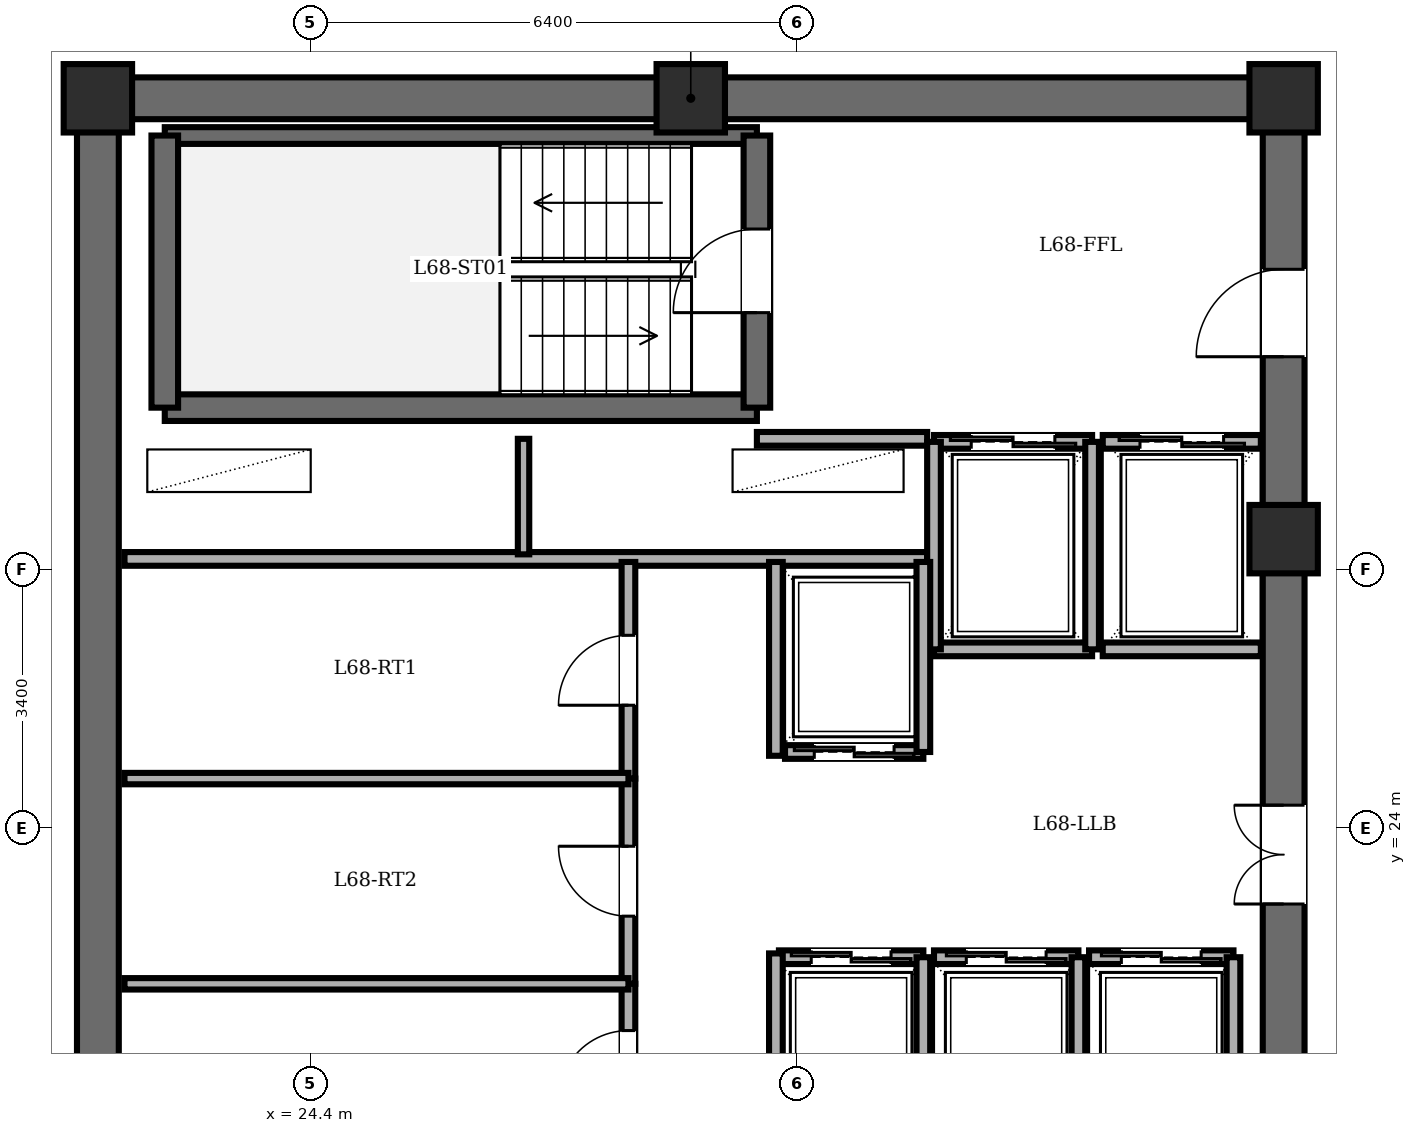
"""IFC4 building model, lengths in metres.
Left out: names, types, materials, properties, quantities, classifications, styles, units other than length and angle.
Written with IfcOpenShell. Run it as: python <this file> out.ifc"""

import sys

from ifc_helpers import new_model, si_unit, direction, frame, frame_2d, origin, origin_2d, place, context, subcontext, project, spatial, rectangle, extrude, element, fill, save


model = new_model("IFC4")
c1 = context("Model", 3, precision=1e-05, world=origin(), true_north=direction((0.0, 1.0)))
c2 = subcontext(c1, "Body", "Model", "MODEL_VIEW")
j1 = project(units=[si_unit("LENGTHUNIT", "METRE"), si_unit("PLANEANGLEUNIT", "RADIAN")], contexts=[c1])
p1 = place(None, origin())
s1 = spatial("IfcSite", under=j1, at=p1, CompositionType="ELEMENT")
p2 = place(p1, origin())
s2 = spatial("IfcBuilding", under=s1, at=p2, CompositionType="ELEMENT")
p3 = place(p2, frame((0.0, 0.0, 262.45)))
s3 = spatial("IfcBuildingStorey", under=s2, at=p3, CompositionType="ELEMENT", Elevation=262.45)
for number, where, z_axis, x_axis in (
    (1, (37.2, 27.8, 0.0), (0.0, 0.0, 1.0), (1.0, 0.0, 0.0)),
    (2, (37.2, 33.6, 0.0), (0.0, 0.0, 1.0), (1.0, 0.0, 0.0)),
    (3, (29.4, 33.6, 0.0), (0.0, 0.0, 1.0), (1.0, 0.0, 0.0)),
    (4, (21.6, 33.6, 0.0), (0.0, 0.0, 1.0), (1.0, 0.0, 0.0)),
):
    element("IfcColumn", number, at=place(p3, frame(where, z_axis=z_axis, x_axis=x_axis)), inside=s3, PredefinedType="COLUMN", context=c2, shape_type="SweptSolid", body=[
        extrude(rectangle(XDim=0.9, YDim=0.9, at=origin_2d()), origin(), (0.0, 0.0, 1.0), 3.65),
    ])
p4 = place(p3, frame((21.6, 14.4, 0.0), z_axis=(0.0, 0.0, 1.0), x_axis=(0.0, 1.0, 0.0)))
e5 = element("IfcWall", 5, at=p4, inside=s3, PredefinedType="SHEAR", context=c2, shape_type="SweptSolid", body=[
    extrude(rectangle(XDim=19.2, YDim=0.55, at=frame_2d((9.6, 0.0))), origin(), (0.0, 0.0, 1.0), 3.45),
])
p5 = place(p3, frame((21.6, 33.6, 0.0), z_axis=(0.0, 0.0, 1.0), x_axis=(1.0, 0.0, 0.0)))
e6 = element("IfcWall", 6, at=p5, inside=s3, PredefinedType="SHEAR", context=c2, shape_type="SweptSolid", body=[
    extrude(rectangle(XDim=15.6, YDim=0.55, at=frame_2d((7.8, 0.0))), origin(), (0.0, 0.0, 1.0), 3.45),
])
p6 = place(p3, frame((37.2, 14.4, 0.0), z_axis=(0.0, 0.0, 1.0), x_axis=(0.0, 1.0, 0.0)))
e7 = element("IfcWall", 7, at=p6, inside=s3, PredefinedType="SHEAR", context=c2, shape_type="SweptSolid", body=[
    extrude(rectangle(XDim=19.2, YDim=0.55, at=frame_2d((9.6, 0.0))), origin(), (0.0, 0.0, 1.0), 3.45),
])
p7 = place(p6, frame((15.8, 0.0, 0.0)))
e8 = element("IfcOpeningElement", 8, at=p7, cuts=e7, PredefinedType="OPENING", context=c2, shape_type="SweptSolid", body=[
    extrude(rectangle(XDim=1.15, YDim=2.15, at=frame_2d((0.575, 1.075))), frame((0.0, 0.285, 0.0), z_axis=(0.0, -1.0, 0.0), x_axis=(1.0, 0.0, 0.0)), (0.0, 0.0, 1.0), 0.57),
])
p8 = place(p6, frame((3.6, 0.0, 0.0)))
e9 = element("IfcOpeningElement", 9, at=p8, cuts=e7, PredefinedType="OPENING", context=c2, shape_type="SweptSolid", body=[
    extrude(rectangle(XDim=1.1, YDim=2.15, at=frame_2d((0.55, 1.075))), frame((0.0, 0.285, 0.0), z_axis=(0.0, -1.0, 0.0), x_axis=(1.0, 0.0, 0.0)), (0.0, 0.0, 1.0), 0.57),
])
p9 = place(p6, frame((8.6, 0.0, 0.0)))
e10 = element("IfcOpeningElement", 10, at=p9, cuts=e7, PredefinedType="OPENING", context=c2, shape_type="SweptSolid", body=[
    extrude(rectangle(XDim=1.3, YDim=2.2, at=frame_2d((0.65, 1.1))), frame((0.0, 0.285, 0.0), z_axis=(0.0, -1.0, 0.0), x_axis=(1.0, 0.0, 0.0)), (0.0, 0.0, 1.0), 0.57),
])
p10 = place(p3, frame((22.48, 29.53, 0.0), z_axis=(0.0, 0.0, 1.0), x_axis=(1.0, 0.0, 0.0)))
e11 = element("IfcWall", 11, at=p10, inside=s3, PredefinedType="SOLIDWALL", context=c2, shape_type="SweptSolid", body=[
    extrude(rectangle(XDim=7.79, YDim=0.35, at=frame_2d((3.895, 0.0))), origin(), (0.0, 0.0, 1.0), 3.45),
])
p11 = place(p3, frame((22.48, 33.11, 0.0), z_axis=(0.0, 0.0, 1.0), x_axis=(1.0, 0.0, 0.0)))
e12 = element("IfcWall", 12, at=p11, inside=s3, PredefinedType="PARTITIONING", context=c2, shape_type="SweptSolid", body=[
    extrude(rectangle(XDim=7.79, YDim=0.22, at=frame_2d((3.895, 0.0))), origin(), (0.0, 0.0, 1.0), 3.45),
])
p12 = place(p3, frame((22.48, 29.53, 0.0), z_axis=(0.0, 0.0, 1.0), x_axis=(0.0, 1.0, 0.0)))
e13 = element("IfcWall", 13, at=p12, inside=s3, PredefinedType="SOLIDWALL", context=c2, shape_type="SweptSolid", body=[
    extrude(rectangle(XDim=3.58, YDim=0.35, at=frame_2d((1.79, 0.0))), origin(), (0.0, 0.0, 1.0), 3.45),
])
p13 = place(p3, frame((30.27, 29.53, 0.0), z_axis=(0.0, 0.0, 1.0), x_axis=(0.0, 1.0, 0.0)))
e14 = element("IfcWall", 14, at=p13, inside=s3, PredefinedType="SOLIDWALL", context=c2, shape_type="SweptSolid", body=[
    extrude(rectangle(XDim=3.58, YDim=0.35, at=frame_2d((1.79, 0.0))), origin(), (0.0, 0.0, 1.0), 3.45),
])
p14 = place(p13, frame((1.25, 0.0, 0.0)))
e15 = element("IfcOpeningElement", 15, at=p14, cuts=e14, PredefinedType="OPENING", context=c2, shape_type="SweptSolid", body=[
    extrude(rectangle(XDim=1.1, YDim=2.15, at=frame_2d((0.55, 1.075))), frame((0.0, 0.185, 0.0), z_axis=(0.0, -1.0, 0.0), x_axis=(1.0, 0.0, 0.0)), (0.0, 0.0, 1.0), 0.37),
])
p15 = place(p3, frame((30.27, 29.12, 0.0), z_axis=(0.0, 0.0, 1.0), x_axis=(1.0, 0.0, 0.0)))
e16 = element("IfcWall", 16, at=p15, inside=s3, PredefinedType="PARTITIONING", context=c2, shape_type="SweptSolid", body=[
    extrude(rectangle(XDim=2.24, YDim=0.18, at=frame_2d((1.12, 0.0))), origin(), (0.0, 0.0, 1.0), 3.45),
])
p16 = place(p3, frame((21.95, 27.54, 0.0), z_axis=(0.0, 0.0, 1.0), x_axis=(1.0, 0.0, 0.0)))
e17 = element("IfcWall", 17, at=p16, inside=s3, PredefinedType="PARTITIONING", context=c2, shape_type="SweptSolid", body=[
    extrude(rectangle(XDim=10.56, YDim=0.18, at=frame_2d((5.28, 0.0))), origin(), (0.0, 0.0, 1.0), 3.45),
])
p17 = place(p3, frame((27.2, 27.6, 0.0), z_axis=(0.0, 0.0, 1.0), x_axis=(0.0, 1.0, 0.0)))
e18 = element("IfcWall", 18, at=p17, inside=s3, PredefinedType="PARTITIONING", context=c2, shape_type="SweptSolid", body=[
    extrude(rectangle(XDim=1.52, YDim=0.15, at=frame_2d((0.76, 0.0))), origin(), (0.0, 0.0, 1.0), 3.45),
])
p18 = place(p3, frame((32.6, 29.08, 0.0), z_axis=(0.0, 0.0, 1.0), x_axis=(1.0, 0.0, 0.0)))
e19 = element("IfcWall", 19, at=p18, inside=s3, PredefinedType="PARTITIONING", context=c2, shape_type="SweptSolid", body=[
    extrude(rectangle(XDim=2.08, YDim=0.18, at=frame_2d((1.04, 0.0))), origin(), (0.0, 0.0, 1.0), 3.45),
])
p19 = place(p18, frame((0.49, 0.0, 0.0)))
e20 = element("IfcOpeningElement", 20, at=p19, cuts=e19, PredefinedType="OPENING", context=c2, shape_type="SweptSolid", body=[
    extrude(rectangle(XDim=1.1, YDim=2.2, at=frame_2d((0.55, 1.1))), frame((0.0, 0.1, 0.0), z_axis=(0.0, -1.0, 0.0), x_axis=(1.0, 0.0, 0.0)), (0.0, 0.0, 1.0), 0.2),
])
p20 = place(p3, frame((34.68, 26.35, 0.0), z_axis=(0.0, 0.0, 1.0), x_axis=(-1.0, 0.0, 0.0)))
e21 = element("IfcWall", 21, at=p20, inside=s3, PredefinedType="PARTITIONING", context=c2, shape_type="SweptSolid", body=[
    extrude(rectangle(XDim=2.08, YDim=0.18, at=frame_2d((1.04, 0.0))), origin(), (0.0, 0.0, 1.0), 3.45),
])
for number, where, z_axis, x_axis in (
    (22, (34.68, 26.35, 0.0), (0.0, 0.0, 1.0), (0.0, 1.0, 0.0)),
    (23, (32.6, 29.08, 0.0), (0.0, 0.0, 1.0), (0.0, -1.0, 0.0)),
):
    element("IfcWall", number, at=place(p3, frame(where, z_axis=z_axis, x_axis=x_axis)), inside=s3, PredefinedType="PARTITIONING", context=c2, shape_type="SweptSolid", body=[
        extrude(rectangle(XDim=2.73, YDim=0.18, at=frame_2d((1.365, 0.0))), origin(), (0.0, 0.0, 1.0), 3.45),
    ])
p21 = place(p3, frame((34.82, 29.08, 0.0), z_axis=(0.0, 0.0, 1.0), x_axis=(1.0, 0.0, 0.0)))
e24 = element("IfcWall", 24, at=p21, inside=s3, PredefinedType="PARTITIONING", context=c2, shape_type="SweptSolid", body=[
    extrude(rectangle(XDim=2.08, YDim=0.18, at=frame_2d((1.04, 0.0))), origin(), (0.0, 0.0, 1.0), 3.45),
])
p22 = place(p21, frame((0.49, 0.0, 0.0)))
e25 = element("IfcOpeningElement", 25, at=p22, cuts=e24, PredefinedType="OPENING", context=c2, shape_type="SweptSolid", body=[
    extrude(rectangle(XDim=1.1, YDim=2.2, at=frame_2d((0.55, 1.1))), frame((0.0, 0.1, 0.0), z_axis=(0.0, -1.0, 0.0), x_axis=(1.0, 0.0, 0.0)), (0.0, 0.0, 1.0), 0.2),
])
p23 = place(p3, frame((36.9, 26.35, 0.0), z_axis=(0.0, 0.0, 1.0), x_axis=(-1.0, 0.0, 0.0)))
e26 = element("IfcWall", 26, at=p23, inside=s3, PredefinedType="PARTITIONING", context=c2, shape_type="SweptSolid", body=[
    extrude(rectangle(XDim=2.08, YDim=0.18, at=frame_2d((1.04, 0.0))), origin(), (0.0, 0.0, 1.0), 3.45),
])
p24 = place(p3, frame((32.46, 25.0, 0.0), z_axis=(0.0, 0.0, 1.0), x_axis=(-1.0, 0.0, 0.0)))
e27 = element("IfcWall", 27, at=p24, inside=s3, PredefinedType="PARTITIONING", context=c2, shape_type="SweptSolid", body=[
    extrude(rectangle(XDim=1.82, YDim=0.18, at=frame_2d((0.91, 0.0))), origin(), (0.0, 0.0, 1.0), 3.45),
])
p25 = place(p24, frame((0.385, 0.0, 0.0)))
e28 = element("IfcOpeningElement", 28, at=p25, cuts=e27, PredefinedType="OPENING", context=c2, shape_type="SweptSolid", body=[
    extrude(rectangle(XDim=1.05, YDim=2.2, at=frame_2d((0.525, 1.1))), frame((0.0, 0.1, 0.0), z_axis=(0.0, -1.0, 0.0), x_axis=(1.0, 0.0, 0.0)), (0.0, 0.0, 1.0), 0.2),
])
p26 = place(p3, frame((32.46, 25.0, 0.0), z_axis=(0.0, 0.0, 1.0), x_axis=(0.0, 1.0, 0.0)))
e29 = element("IfcWall", 29, at=p26, inside=s3, PredefinedType="PARTITIONING", context=c2, shape_type="SweptSolid", body=[
    extrude(rectangle(XDim=2.5, YDim=0.18, at=frame_2d((1.25, 0.0))), origin(), (0.0, 0.0, 1.0), 3.45),
])
p27 = place(p3, frame((30.56, 22.3, 0.0), z_axis=(0.0, 0.0, 1.0), x_axis=(1.0, 0.0, 0.0)))
e30 = element("IfcWall", 30, at=p27, inside=s3, PredefinedType="PARTITIONING", context=c2, shape_type="SweptSolid", body=[
    extrude(rectangle(XDim=1.9, YDim=0.18, at=frame_2d((0.95, 0.0))), origin(), (0.0, 0.0, 1.0), 3.45),
])
p28 = place(p27, frame((0.425, 0.0, 0.0)))
e31 = element("IfcOpeningElement", 31, at=p28, cuts=e30, PredefinedType="OPENING", context=c2, shape_type="SweptSolid", body=[
    extrude(rectangle(XDim=1.05, YDim=2.2, at=frame_2d((0.525, 1.1))), frame((0.0, 0.1, 0.0), z_axis=(0.0, -1.0, 0.0), x_axis=(1.0, 0.0, 0.0)), (0.0, 0.0, 1.0), 0.2),
])
p29 = place(p3, frame((32.46, 19.8, 0.0), z_axis=(0.0, 0.0, 1.0), x_axis=(0.0, 1.0, 0.0)))
e32 = element("IfcWall", 32, at=p29, inside=s3, PredefinedType="PARTITIONING", context=c2, shape_type="SweptSolid", body=[
    extrude(rectangle(XDim=2.5, YDim=0.18, at=frame_2d((1.25, 0.0))), origin(), (0.0, 0.0, 1.0), 3.45),
])
p30 = place(p3, frame((32.6, 22.3, 0.0), z_axis=(0.0, 0.0, 1.0), x_axis=(1.0, 0.0, 0.0)))
e33 = element("IfcWall", 33, at=p30, inside=s3, PredefinedType="PARTITIONING", context=c2, shape_type="SweptSolid", body=[
    extrude(rectangle(XDim=1.9, YDim=0.18, at=frame_2d((0.95, 0.0))), origin(), (0.0, 0.0, 1.0), 3.45),
])
p31 = place(p30, frame((0.425, 0.0, 0.0)))
e34 = element("IfcOpeningElement", 34, at=p31, cuts=e33, PredefinedType="OPENING", context=c2, shape_type="SweptSolid", body=[
    extrude(rectangle(XDim=1.05, YDim=2.2, at=frame_2d((0.525, 1.1))), frame((0.0, 0.1, 0.0), z_axis=(0.0, -1.0, 0.0), x_axis=(1.0, 0.0, 0.0)), (0.0, 0.0, 1.0), 0.2),
])
p32 = place(p3, frame((34.5, 19.8, 0.0), z_axis=(0.0, 0.0, 1.0), x_axis=(0.0, 1.0, 0.0)))
e35 = element("IfcWall", 35, at=p32, inside=s3, PredefinedType="PARTITIONING", context=c2, shape_type="SweptSolid", body=[
    extrude(rectangle(XDim=2.5, YDim=0.18, at=frame_2d((1.25, 0.0))), origin(), (0.0, 0.0, 1.0), 3.45),
])
p33 = place(p3, frame((34.64, 22.3, 0.0), z_axis=(0.0, 0.0, 1.0), x_axis=(1.0, 0.0, 0.0)))
e36 = element("IfcWall", 36, at=p33, inside=s3, PredefinedType="PARTITIONING", context=c2, shape_type="SweptSolid", body=[
    extrude(rectangle(XDim=1.9, YDim=0.18, at=frame_2d((0.95, 0.0))), origin(), (0.0, 0.0, 1.0), 3.45),
])
p34 = place(p33, frame((0.425, 0.0, 0.0)))
e37 = element("IfcOpeningElement", 37, at=p34, cuts=e36, PredefinedType="OPENING", context=c2, shape_type="SweptSolid", body=[
    extrude(rectangle(XDim=1.05, YDim=2.2, at=frame_2d((0.525, 1.1))), frame((0.0, 0.1, 0.0), z_axis=(0.0, -1.0, 0.0), x_axis=(1.0, 0.0, 0.0)), (0.0, 0.0, 1.0), 0.2),
])
p35 = place(p3, frame((36.54, 19.8, 0.0), z_axis=(0.0, 0.0, 1.0), x_axis=(0.0, 1.0, 0.0)))
e38 = element("IfcWall", 38, at=p35, inside=s3, PredefinedType="PARTITIONING", context=c2, shape_type="SweptSolid", body=[
    extrude(rectangle(XDim=2.5, YDim=0.18, at=frame_2d((1.25, 0.0))), origin(), (0.0, 0.0, 1.0), 3.45),
])
for number, where, z_axis, x_axis in (
    (39, (30.52, 24.95, 0.0), (0.0, 0.0, 1.0), (0.0, 1.0, 0.0)),
    (40, (30.52, 19.8, 0.0), (0.0, 0.0, 1.0), (0.0, 1.0, 0.0)),
):
    element("IfcWall", number, at=place(p3, frame(where, z_axis=z_axis, x_axis=x_axis)), inside=s3, PredefinedType="PARTITIONING", context=c2, shape_type="SweptSolid", body=[
        extrude(rectangle(XDim=2.55, YDim=0.18, at=frame_2d((1.275, 0.0))), origin(), (0.0, 0.0, 1.0), 3.45),
    ])
p36 = place(p3, frame((28.58, 24.65, 0.0), z_axis=(0.0, 0.0, 1.0), x_axis=(0.0, 1.0, 0.0)))
e41 = element("IfcWall", 41, at=p36, inside=s3, PredefinedType="PARTITIONING", context=c2, shape_type="SweptSolid", body=[
    extrude(rectangle(XDim=2.85, YDim=0.18, at=frame_2d((1.425, 0.0))), origin(), (0.0, 0.0, 1.0), 3.45),
])
p37 = place(p36, frame((0.965, 0.0, 0.0)))
e42 = element("IfcOpeningElement", 42, at=p37, cuts=e41, PredefinedType="OPENING", context=c2, shape_type="SweptSolid", body=[
    extrude(rectangle(XDim=0.92, YDim=2.1, at=frame_2d((0.46, 1.05))), frame((0.0, 0.1, 0.0), z_axis=(0.0, -1.0, 0.0), x_axis=(1.0, 0.0, 0.0)), (0.0, 0.0, 1.0), 0.2),
])
p38 = place(p3, frame((28.58, 21.95, 0.0), z_axis=(0.0, 0.0, 1.0), x_axis=(0.0, 1.0, 0.0)))
e43 = element("IfcWall", 43, at=p38, inside=s3, PredefinedType="PARTITIONING", context=c2, shape_type="SweptSolid", body=[
    extrude(rectangle(XDim=2.7, YDim=0.18, at=frame_2d((1.35, 0.0))), origin(), (0.0, 0.0, 1.0), 3.45),
])
p39 = place(p38, frame((0.89, 0.0, 0.0)))
e44 = element("IfcOpeningElement", 44, at=p39, cuts=e43, PredefinedType="OPENING", context=c2, shape_type="SweptSolid", body=[
    extrude(rectangle(XDim=0.92, YDim=2.1, at=frame_2d((0.46, 1.05))), frame((0.0, 0.1, 0.0), z_axis=(0.0, -1.0, 0.0), x_axis=(1.0, 0.0, 0.0)), (0.0, 0.0, 1.0), 0.2),
])
p40 = place(p3, frame((28.58, 19.8, 0.0), z_axis=(0.0, 0.0, 1.0), x_axis=(0.0, 1.0, 0.0)))
e45 = element("IfcWall", 45, at=p40, inside=s3, PredefinedType="PARTITIONING", context=c2, shape_type="SweptSolid", body=[
    extrude(rectangle(XDim=2.15, YDim=0.18, at=frame_2d((1.075, 0.0))), origin(), (0.0, 0.0, 1.0), 3.45),
])
p41 = place(p40, frame((0.615, 0.0, 0.0)))
e46 = element("IfcOpeningElement", 46, at=p41, cuts=e45, PredefinedType="OPENING", context=c2, shape_type="SweptSolid", body=[
    extrude(rectangle(XDim=0.92, YDim=2.1, at=frame_2d((0.46, 1.05))), frame((0.0, 0.1, 0.0), z_axis=(0.0, -1.0, 0.0), x_axis=(1.0, 0.0, 0.0)), (0.0, 0.0, 1.0), 0.2),
])
for number, where, z_axis, x_axis in (
    (47, (21.95, 24.65, 0.0), (0.0, 0.0, 1.0), (1.0, 0.0, 0.0)),
    (48, (21.95, 21.95, 0.0), (0.0, 0.0, 1.0), (1.0, 0.0, 0.0)),
):
    element("IfcWall", number, at=place(p3, frame(where, z_axis=z_axis, x_axis=x_axis)), inside=s3, PredefinedType="PARTITIONING", context=c2, shape_type="SweptSolid", body=[
        extrude(rectangle(XDim=6.63, YDim=0.15, at=frame_2d((3.315, 0.0))), origin(), (0.0, 0.0, 1.0), 3.45),
    ])
p42 = place(p14, origin())
e49 = element("IfcDoor", 49, at=p42, inside=s3, OperationType="SINGLE_SWING_LEFT", PredefinedType="DOOR", context=c2, shape_type="SweptSolid", body=[
    extrude(rectangle(XDim=1.1, YDim=2.15, at=frame_2d((0.55, 1.075))), frame((0.0, 0.025, 0.0), z_axis=(0.0, -1.0, 0.0), x_axis=(1.0, 0.0, 0.0)), (0.0, 0.0, 1.0), 0.05),
])
fill(e15, e49)
p43 = place(p7, origin())
e50 = element("IfcDoor", 50, at=p43, inside=s3, OperationType="SINGLE_SWING_LEFT", PredefinedType="DOOR", context=c2, shape_type="SweptSolid", body=[
    extrude(rectangle(XDim=1.15, YDim=2.15, at=frame_2d((0.575, 1.075))), frame((0.0, 0.025, 0.0), z_axis=(0.0, -1.0, 0.0), x_axis=(1.0, 0.0, 0.0)), (0.0, 0.0, 1.0), 0.05),
])
fill(e8, e50)
p44 = place(p19, origin())
e51 = element("IfcDoor", 51, at=p44, inside=s3, OperationType="DOUBLE_DOOR_SLIDING", PredefinedType="DOOR", context=c2, shape_type="SweptSolid", body=[
    extrude(rectangle(XDim=1.1, YDim=2.2, at=frame_2d((0.55, 1.1))), frame((0.0, 0.025, 0.0), z_axis=(0.0, -1.0, 0.0), x_axis=(1.0, 0.0, 0.0)), (0.0, 0.0, 1.0), 0.05),
])
fill(e20, e51)
p45 = place(p22, origin())
e52 = element("IfcDoor", 52, at=p45, inside=s3, OperationType="DOUBLE_DOOR_SLIDING", PredefinedType="DOOR", context=c2, shape_type="SweptSolid", body=[
    extrude(rectangle(XDim=1.1, YDim=2.2, at=frame_2d((0.55, 1.1))), frame((0.0, 0.025, 0.0), z_axis=(0.0, -1.0, 0.0), x_axis=(1.0, 0.0, 0.0)), (0.0, 0.0, 1.0), 0.05),
])
fill(e25, e52)
p46 = place(p25, origin())
e53 = element("IfcDoor", 53, at=p46, inside=s3, OperationType="DOUBLE_DOOR_SLIDING", PredefinedType="DOOR", context=c2, shape_type="SweptSolid", body=[
    extrude(rectangle(XDim=1.05, YDim=2.2, at=frame_2d((0.525, 1.1))), frame((0.0, 0.025, 0.0), z_axis=(0.0, -1.0, 0.0), x_axis=(1.0, 0.0, 0.0)), (0.0, 0.0, 1.0), 0.05),
])
fill(e28, e53)
p47 = place(p28, origin())
e54 = element("IfcDoor", 54, at=p47, inside=s3, OperationType="DOUBLE_DOOR_SLIDING", PredefinedType="DOOR", context=c2, shape_type="SweptSolid", body=[
    extrude(rectangle(XDim=1.05, YDim=2.2, at=frame_2d((0.525, 1.1))), frame((0.0, 0.025, 0.0), z_axis=(0.0, -1.0, 0.0), x_axis=(1.0, 0.0, 0.0)), (0.0, 0.0, 1.0), 0.05),
])
fill(e31, e54)
p48 = place(p31, origin())
e55 = element("IfcDoor", 55, at=p48, inside=s3, OperationType="DOUBLE_DOOR_SLIDING", PredefinedType="DOOR", context=c2, shape_type="SweptSolid", body=[
    extrude(rectangle(XDim=1.05, YDim=2.2, at=frame_2d((0.525, 1.1))), frame((0.0, 0.025, 0.0), z_axis=(0.0, -1.0, 0.0), x_axis=(1.0, 0.0, 0.0)), (0.0, 0.0, 1.0), 0.05),
])
fill(e34, e55)
p49 = place(p34, origin())
e56 = element("IfcDoor", 56, at=p49, inside=s3, OperationType="DOUBLE_DOOR_SLIDING", PredefinedType="DOOR", context=c2, shape_type="SweptSolid", body=[
    extrude(rectangle(XDim=1.05, YDim=2.2, at=frame_2d((0.525, 1.1))), frame((0.0, 0.025, 0.0), z_axis=(0.0, -1.0, 0.0), x_axis=(1.0, 0.0, 0.0)), (0.0, 0.0, 1.0), 0.05),
])
fill(e37, e56)
p50 = place(p37, origin())
e57 = element("IfcDoor", 57, at=p50, inside=s3, OperationType="SINGLE_SWING_LEFT", PredefinedType="DOOR", context=c2, shape_type="SweptSolid", body=[
    extrude(rectangle(XDim=0.92, YDim=2.1, at=frame_2d((0.46, 1.05))), frame((0.0, 0.025, 0.0), z_axis=(0.0, -1.0, 0.0), x_axis=(1.0, 0.0, 0.0)), (0.0, 0.0, 1.0), 0.05),
])
fill(e42, e57)
p51 = place(p39, origin())
e58 = element("IfcDoor", 58, at=p51, inside=s3, OperationType="SINGLE_SWING_RIGHT", PredefinedType="DOOR", context=c2, shape_type="SweptSolid", body=[
    extrude(rectangle(XDim=0.92, YDim=2.1, at=frame_2d((0.46, 1.05))), frame((0.0, 0.025, 0.0), z_axis=(0.0, -1.0, 0.0), x_axis=(1.0, 0.0, 0.0)), (0.0, 0.0, 1.0), 0.05),
])
fill(e44, e58)
p52 = place(p41, origin())
e59 = element("IfcDoor", 59, at=p52, inside=s3, OperationType="SINGLE_SWING_LEFT", PredefinedType="DOOR", context=c2, shape_type="SweptSolid", body=[
    extrude(rectangle(XDim=0.92, YDim=2.1, at=frame_2d((0.46, 1.05))), frame((0.0, 0.025, 0.0), z_axis=(0.0, -1.0, 0.0), x_axis=(1.0, 0.0, 0.0)), (0.0, 0.0, 1.0), 0.05),
])
fill(e46, e59)
p53 = place(p9, origin())
e60 = element("IfcDoor", 60, at=p53, inside=s3, OperationType="DOUBLE_DOOR_SINGLE_SWING", PredefinedType="DOOR", context=c2, shape_type="SweptSolid", body=[
    extrude(rectangle(XDim=1.3, YDim=2.2, at=frame_2d((0.65, 1.1))), frame((0.0, 0.025, 0.0), z_axis=(0.0, -1.0, 0.0), x_axis=(1.0, 0.0, 0.0)), (0.0, 0.0, 1.0), 0.05),
])
fill(e10, e60)
save(model, sys.argv[1])
